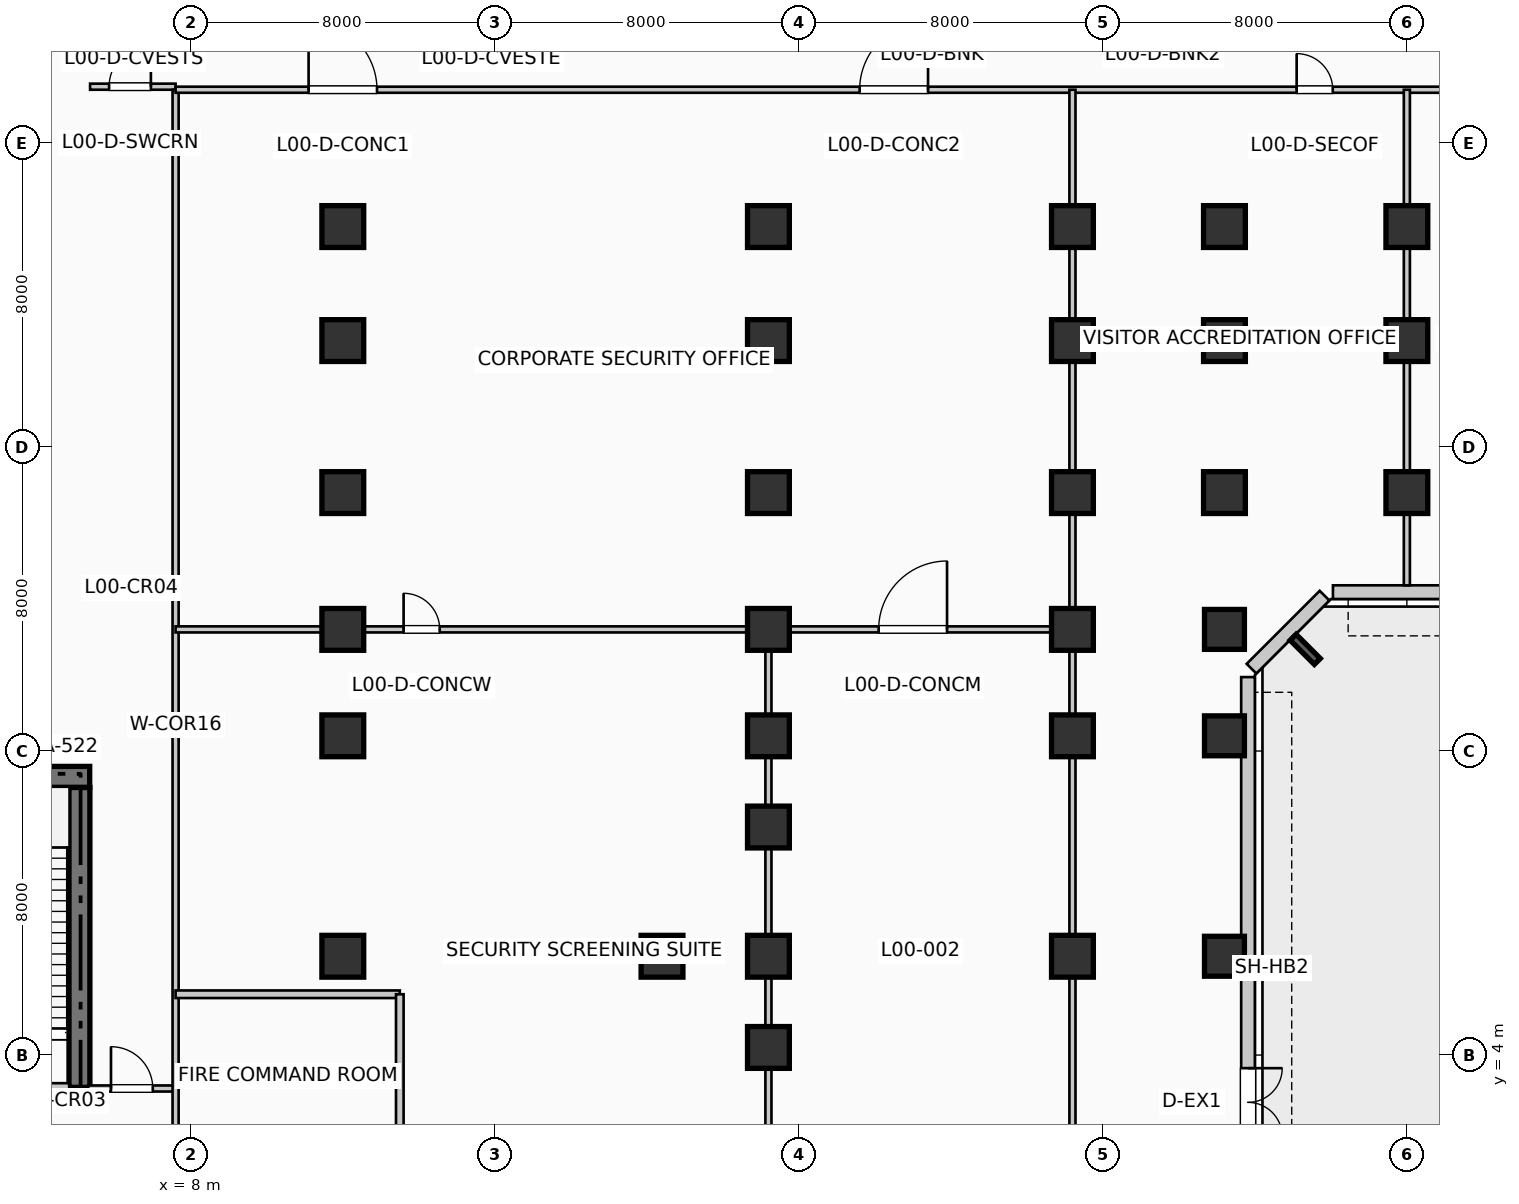
"""IFC4 building model, lengths in metres.
Left out: names, types, materials, properties, quantities, classifications, styles, units other than length and angle.
Written with IfcOpenShell. Run it as: python <this file> out.ifc"""

import sys

from ifc_helpers import new_model, si_unit, direction, frame, frame_2d, origin, origin_2d, place, context, subcontext, project, spatial, rectangle, extrude, element, fill, save


model = new_model("IFC4")
c1 = context("Model", 3, precision=1e-05, world=origin(), true_north=direction((0.0, 1.0)))
c2 = subcontext(c1, "Body", "Model", "MODEL_VIEW")
j1 = project(units=[si_unit("LENGTHUNIT", "METRE"), si_unit("PLANEANGLEUNIT", "RADIAN")], contexts=[c1])
p1 = place(None, origin())
s1 = spatial("IfcSite", under=j1, at=p1, CompositionType="ELEMENT")
p2 = place(p1, origin())
s2 = spatial("IfcBuilding", under=s1, at=p2, CompositionType="ELEMENT")
p3 = place(p2, origin())
s3 = spatial("IfcBuildingStorey", under=s2, at=p3, CompositionType="ELEMENT", Elevation=0.0)
p4 = place(p3, frame((5.07, 3.15, 0.0), z_axis=(0.0, 0.0, 1.0), x_axis=(0.0, 1.0, 0.0)))
e1 = element("IfcWall", 1, at=p4, inside=s3, PredefinedType="SHEAR", context=c2, shape_type="SweptSolid", body=[
    extrude(rectangle(XDim=7.89, YDim=0.55, at=frame_2d((3.945, 0.0))), origin(), (0.0, 0.0, 1.0), 5.94),
])
p5 = place(p3, frame((1.1, 11.32, 0.0), z_axis=(0.0, 0.0, 1.0), x_axis=(1.0, 0.0, 0.0)))
e2 = element("IfcWall", 2, at=p5, inside=s3, PredefinedType="SHEAR", context=c2, shape_type="SweptSolid", body=[
    extrude(rectangle(XDim=4.24, YDim=0.55, at=frame_2d((2.12, 0.0))), origin(), (0.0, 0.0, 1.0), 5.94),
])
for number, where, z_axis, x_axis in (
    (3, (12.0, 6.6, 0.0), (0.0, 0.0, 1.0), (1.0, 0.0, 0.0)),
    (4, (12.0, 12.4, 0.0), (0.0, 0.0, 1.0), (1.0, 0.0, 0.0)),
    (5, (12.0, 15.2, 0.0), (0.0, 0.0, 1.0), (1.0, 0.0, 0.0)),
    (6, (12.0, 18.8, 0.0), (0.0, 0.0, 1.0), (1.0, 0.0, 0.0)),
    (7, (12.0, 22.8, 0.0), (0.0, 0.0, 1.0), (1.0, 0.0, 0.0)),
    (8, (12.0, 25.8, 0.0), (0.0, 0.0, 1.0), (1.0, 0.0, 0.0)),
    (9, (20.4, 6.6, 0.0), (0.0, 0.0, 1.0), (1.0, 0.0, 0.0)),
    (10, (23.2, 4.2, 0.0), (0.0, 0.0, 1.0), (1.0, 0.0, 0.0)),
    (11, (23.2, 6.6, 0.0), (0.0, 0.0, 1.0), (1.0, 0.0, 0.0)),
    (12, (23.2, 10.0, 0.0), (0.0, 0.0, 1.0), (1.0, 0.0, 0.0)),
    (13, (23.2, 12.4, 0.0), (0.0, 0.0, 1.0), (1.0, 0.0, 0.0)),
    (14, (23.2, 15.2, 0.0), (0.0, 0.0, 1.0), (1.0, 0.0, 0.0)),
    (15, (23.2, 18.8, 0.0), (0.0, 0.0, 1.0), (1.0, 0.0, 0.0)),
    (16, (23.2, 22.8, 0.0), (0.0, 0.0, 1.0), (1.0, 0.0, 0.0)),
    (17, (23.2, 25.8, 0.0), (0.0, 0.0, 1.0), (1.0, 0.0, 0.0)),
    (18, (31.2, 6.6, 0.0), (0.0, 0.0, 1.0), (1.0, 0.0, 0.0)),
    (19, (31.2, 12.4, 0.0), (0.0, 0.0, 1.0), (1.0, 0.0, 0.0)),
    (20, (31.2, 15.2, 0.0), (0.0, 0.0, 1.0), (1.0, 0.0, 0.0)),
    (21, (31.2, 18.8, 0.0), (0.0, 0.0, 1.0), (1.0, 0.0, 0.0)),
    (22, (31.2, 22.8, 0.0), (0.0, 0.0, 1.0), (1.0, 0.0, 0.0)),
    (23, (31.2, 25.8, 0.0), (0.0, 0.0, 1.0), (1.0, 0.0, 0.0)),
):
    element("IfcColumn", number, at=place(p3, frame(where, z_axis=z_axis, x_axis=x_axis)), inside=s3, PredefinedType="COLUMN", context=c2, shape_type="SweptSolid", body=[
        extrude(rectangle(XDim=1.1, YDim=1.1, at=origin_2d()), origin(), (0.0, 0.0, 1.0), 5.94),
    ])
for number, where, z_axis, x_axis in (
    (24, (35.2, 6.6, 0.0), (0.0, 0.0, 1.0), (1.0, 0.0, 0.0)),
    (25, (35.2, 12.4, 0.0), (0.0, 0.0, 1.0), (1.0, 0.0, 0.0)),
    (26, (35.2, 15.2, 0.0), (0.0, 0.0, 1.0), (1.0, 0.0, 0.0)),
):
    element("IfcColumn", number, at=place(p3, frame(where, z_axis=z_axis, x_axis=x_axis)), inside=s3, PredefinedType="COLUMN", context=c2, shape_type="SweptSolid", body=[
        extrude(rectangle(XDim=1.05, YDim=1.05, at=origin_2d()), origin(), (0.0, 0.0, 1.0), 5.94),
    ])
for number, where, z_axis, x_axis in (
    (27, (35.2, 18.8, 0.0), (0.0, 0.0, 1.0), (1.0, 0.0, 0.0)),
    (28, (35.2, 22.8, 0.0), (0.0, 0.0, 1.0), (1.0, 0.0, 0.0)),
    (29, (35.2, 25.8, 0.0), (0.0, 0.0, 1.0), (1.0, 0.0, 0.0)),
    (30, (40.0, 18.8, 0.0), (0.0, 0.0, 1.0), (1.0, 0.0, 0.0)),
    (31, (40.0, 22.8, 0.0), (0.0, 0.0, 1.0), (1.0, 0.0, 0.0)),
    (32, (40.0, 25.8, 0.0), (0.0, 0.0, 1.0), (1.0, 0.0, 0.0)),
):
    element("IfcColumn", number, at=place(p3, frame(where, z_axis=z_axis, x_axis=x_axis)), inside=s3, PredefinedType="COLUMN", context=c2, shape_type="SweptSolid", body=[
        extrude(rectangle(XDim=1.1, YDim=1.1, at=origin_2d()), origin(), (0.0, 0.0, 1.0), 5.94),
    ])
p6 = place(p3, frame((35.82, 1.055, 0.0), z_axis=(0.0, 0.0, 1.0), x_axis=(0.0, 1.0, 0.0)))
e33 = element("IfcWall", 33, at=p6, inside=s3, PredefinedType="SOLIDWALL", context=c2, shape_type="SweptSolid", body=[
    extrude(rectangle(XDim=12.89, YDim=0.36, at=frame_2d((6.445, 0.0))), origin(), (0.0, 0.0, 1.0), 5.62),
])
p7 = place(p6, frame((2.6, 0.0, 0.0), z_axis=(0.0, 0.0, 1.0), x_axis=(-1.0, 0.0, 0.0)))
e34 = element("IfcOpeningElement", 34, at=p7, cuts=e33, PredefinedType="OPENING", context=c2, shape_type="SweptSolid", body=[
    extrude(rectangle(XDim=1.8, YDim=2.4, at=frame_2d((0.9, 1.2))), frame((0.0, 0.19, 0.0), z_axis=(0.0, -1.0, 0.0), x_axis=(1.0, 0.0, 0.0)), (0.0, 0.0, 1.0), 0.38),
])
p8 = place(p3, frame((35.912, 14.166, 0.0), z_axis=(0.0, 0.0, 1.0), x_axis=(0.707106781187, 0.707106781187, 0.0)))
e35 = element("IfcWall", 35, at=p8, inside=s3, PredefinedType="SOLIDWALL", context=c2, shape_type="SweptSolid", body=[
    extrude(rectangle(XDim=2.718, YDim=0.36, at=frame_2d((1.359, 0.0))), origin(), (0.0, 0.0, 1.0), 5.62),
])
p9 = place(p3, frame((38.055, 16.18, 0.0), z_axis=(0.0, 0.0, 1.0), x_axis=(1.0, 0.0, 0.0)))
e36 = element("IfcWall", 36, at=p9, inside=s3, PredefinedType="SOLIDWALL", context=c2, shape_type="SweptSolid", body=[
    extrude(rectangle(XDim=40.89, YDim=0.36, at=frame_2d((20.445, 0.0))), origin(), (0.0, 0.0, 1.0), 5.62),
])
p10 = place(p9, frame((4.745, 0.0, 0.0), z_axis=(0.0, 0.0, 1.0), x_axis=(-1.0, 0.0, 0.0)))
e37 = element("IfcOpeningElement", 37, at=p10, cuts=e36, PredefinedType="OPENING", context=c2, shape_type="SweptSolid", body=[
    extrude(rectangle(XDim=1.8, YDim=2.2, at=frame_2d((0.9, 1.1))), frame((0.0, 0.19, 0.0), z_axis=(0.0, -1.0, 0.0), x_axis=(1.0, 0.0, 0.0)), (0.0, 0.0, 1.0), 0.38),
])
p11 = place(p9, frame((9.345, 0.0, 0.0), z_axis=(0.0, 0.0, 1.0), x_axis=(-1.0, 0.0, 0.0)))
e38 = element("IfcOpeningElement", 38, at=p11, cuts=e36, PredefinedType="OPENING", context=c2, shape_type="SweptSolid", body=[
    extrude(rectangle(XDim=1.8, YDim=2.2, at=frame_2d((0.9, 1.1))), frame((0.0, 0.19, 0.0), z_axis=(0.0, -1.0, 0.0), x_axis=(1.0, 0.0, 0.0)), (0.0, 0.0, 1.0), 0.38),
])
p12 = place(p9, frame((16.145, 0.0, 0.0), z_axis=(0.0, 0.0, 1.0), x_axis=(-1.0, 0.0, 0.0)))
e39 = element("IfcOpeningElement", 39, at=p12, cuts=e36, PredefinedType="OPENING", context=c2, shape_type="SweptSolid", body=[
    extrude(rectangle(XDim=1.8, YDim=2.2, at=frame_2d((0.9, 1.1))), frame((0.0, 0.19, 0.0), z_axis=(0.0, -1.0, 0.0), x_axis=(1.0, 0.0, 0.0)), (0.0, 0.0, 1.0), 0.38),
])
p13 = place(p9, frame((32.0, 0.0, 0.0), z_axis=(0.0, 0.0, 1.0), x_axis=(-1.0, 0.0, 0.0)))
e40 = element("IfcOpeningElement", 40, at=p13, cuts=e36, PredefinedType="OPENING", context=c2, shape_type="SweptSolid", body=[
    extrude(rectangle(XDim=1.8, YDim=2.4, at=frame_2d((0.9, 1.2))), frame((0.0, 0.19, 0.0), z_axis=(0.0, -1.0, 0.0), x_axis=(1.0, 0.0, 0.0)), (0.0, 0.0, 1.0), 0.38),
])
p14 = place(p3, frame((1.65, 3.15, 0.0), z_axis=(0.0, 0.0, 1.0), x_axis=(1.0, 0.0, 0.0)))
e41 = element("IfcWall", 41, at=p14, inside=s3, PredefinedType="PARTITIONING", context=c2, shape_type="SweptSolid", body=[
    extrude(rectangle(XDim=3.15, YDim=0.22, at=frame_2d((1.575, 0.0))), origin(), (0.0, 0.0, 1.0), 5.62),
])
p15 = place(p14, frame((2.1, 0.0, 0.0), z_axis=(0.0, 0.0, 1.0), x_axis=(-1.0, 0.0, 0.0)))
e42 = element("IfcOpeningElement", 42, at=p15, cuts=e41, PredefinedType="OPENING", context=c2, shape_type="SweptSolid", body=[
    extrude(rectangle(XDim=1.05, YDim=2.15, at=frame_2d((0.525, 1.075))), frame((0.0, 0.12, 0.0), z_axis=(0.0, -1.0, 0.0), x_axis=(1.0, 0.0, 0.0)), (0.0, 0.0, 1.0), 0.24),
])
p16 = place(p3, frame((5.3, 3.12, 0.0), z_axis=(0.0, 0.0, 1.0), x_axis=(1.0, 0.0, 0.0)))
e43 = element("IfcWall", 43, at=p16, inside=s3, PredefinedType="PARTITIONING", context=c2, shape_type="SweptSolid", body=[
    extrude(rectangle(XDim=2.3, YDim=0.16, at=frame_2d((1.15, 0.0))), origin(), (0.0, 0.0, 1.0), 5.62),
])
p17 = place(p16, frame((0.6, 0.0, 0.0)))
e44 = element("IfcOpeningElement", 44, at=p17, cuts=e43, PredefinedType="OPENING", context=c2, shape_type="SweptSolid", body=[
    extrude(rectangle(XDim=1.1, YDim=2.15, at=frame_2d((0.55, 1.075))), frame((0.0, 0.09, 0.0), z_axis=(0.0, -1.0, 0.0), x_axis=(1.0, 0.0, 0.0)), (0.0, 0.0, 1.0), 0.18),
])
p18 = place(p3, frame((5.35, 29.48, 0.0), z_axis=(0.0, 0.0, 1.0), x_axis=(1.0, 0.0, 0.0)))
e45 = element("IfcWall", 45, at=p18, inside=s3, PredefinedType="PARTITIONING", context=c2, shape_type="SweptSolid", body=[
    extrude(rectangle(XDim=2.25, YDim=0.16, at=frame_2d((1.125, 0.0))), origin(), (0.0, 0.0, 1.0), 5.275),
])
p19 = place(p18, frame((0.5, 0.0, 0.0)))
e46 = element("IfcOpeningElement", 46, at=p19, cuts=e45, PredefinedType="OPENING", context=c2, shape_type="SweptSolid", body=[
    extrude(rectangle(XDim=1.1, YDim=2.15, at=frame_2d((0.55, 1.075))), frame((0.0, 0.09, 0.0), z_axis=(0.0, -1.0, 0.0), x_axis=(1.0, 0.0, 0.0)), (0.0, 0.0, 1.0), 0.18),
])
p20 = place(p3, frame((7.6, -1.64, 0.0), z_axis=(0.0, 0.0, 1.0), x_axis=(0.0, 1.0, 0.0)))
e47 = element("IfcWall", 47, at=p20, inside=s3, PredefinedType="PARTITIONING", context=c2, shape_type="SweptSolid", body=[
    extrude(rectangle(XDim=31.04, YDim=0.16, at=frame_2d((15.52, 0.0))), origin(), (0.0, 0.0, 1.0), 5.62),
])
p21 = place(p20, frame((1.8, 0.0, 0.0)))
e48 = element("IfcOpeningElement", 48, at=p21, cuts=e47, PredefinedType="OPENING", context=c2, shape_type="SweptSolid", body=[
    extrude(rectangle(XDim=1.1, YDim=2.15, at=frame_2d((0.55, 1.075))), frame((0.0, 0.09, 0.0), z_axis=(0.0, -1.0, 0.0), x_axis=(1.0, 0.0, 0.0)), (0.0, 0.0, 1.0), 0.18),
])
p22 = place(p3, frame((7.6, 5.6, 0.0), z_axis=(0.0, 0.0, 1.0), x_axis=(1.0, 0.0, 0.0)))
e49 = element("IfcWall", 49, at=p22, inside=s3, PredefinedType="PARTITIONING", context=c2, shape_type="SweptSolid", body=[
    extrude(rectangle(XDim=5.9, YDim=0.2, at=frame_2d((2.95, 0.0))), origin(), (0.0, 0.0, 1.0), 5.62),
])
p23 = place(p3, frame((13.5, -1.64, 0.0), z_axis=(0.0, 0.0, 1.0), x_axis=(0.0, 1.0, 0.0)))
e50 = element("IfcWall", 50, at=p23, inside=s3, PredefinedType="PARTITIONING", context=c2, shape_type="SweptSolid", body=[
    extrude(rectangle(XDim=7.24, YDim=0.2, at=frame_2d((3.62, 0.0))), origin(), (0.0, 0.0, 1.0), 5.62),
])
p24 = place(p3, frame((7.6, 29.4, 0.0), z_axis=(0.0, 0.0, 1.0), x_axis=(1.0, 0.0, 0.0)))
e51 = element("IfcWall", 51, at=p24, inside=s3, PredefinedType="PARTITIONING", context=c2, shape_type="SweptSolid", body=[
    extrude(rectangle(XDim=43.75, YDim=0.16, at=frame_2d((21.875, 0.0))), origin(), (0.0, 0.0, 1.0), 5.275),
])
p25 = place(p24, frame((3.5, 0.0, 0.0)))
e52 = element("IfcOpeningElement", 52, at=p25, cuts=e51, PredefinedType="OPENING", context=c2, shape_type="SweptSolid", body=[
    extrude(rectangle(XDim=1.8, YDim=2.3, at=frame_2d((0.9, 1.15))), frame((0.0, 0.09, 0.0), z_axis=(0.0, -1.0, 0.0), x_axis=(1.0, 0.0, 0.0)), (0.0, 0.0, 1.0), 0.18),
])
p26 = place(p24, frame((18.0, 0.0, 0.0)))
e53 = element("IfcOpeningElement", 53, at=p26, cuts=e51, PredefinedType="OPENING", context=c2, shape_type="SweptSolid", body=[
    extrude(rectangle(XDim=1.8, YDim=2.3, at=frame_2d((0.9, 1.15))), frame((0.0, 0.09, 0.0), z_axis=(0.0, -1.0, 0.0), x_axis=(1.0, 0.0, 0.0)), (0.0, 0.0, 1.0), 0.18),
])
p27 = place(p24, frame((29.5, 0.0, 0.0)))
e54 = element("IfcOpeningElement", 54, at=p27, cuts=e51, PredefinedType="OPENING", context=c2, shape_type="SweptSolid", body=[
    extrude(rectangle(XDim=0.95, YDim=2.15, at=frame_2d((0.475, 1.075))), frame((0.0, 0.09, 0.0), z_axis=(0.0, -1.0, 0.0), x_axis=(1.0, 0.0, 0.0)), (0.0, 0.0, 1.0), 0.18),
])
p28 = place(p24, frame((35.5, 0.0, 0.0)))
e55 = element("IfcOpeningElement", 55, at=p28, cuts=e51, PredefinedType="OPENING", context=c2, shape_type="SweptSolid", body=[
    extrude(rectangle(XDim=1.8, YDim=2.3, at=frame_2d((0.9, 1.15))), frame((0.0, 0.09, 0.0), z_axis=(0.0, -1.0, 0.0), x_axis=(1.0, 0.0, 0.0)), (0.0, 0.0, 1.0), 0.18),
])
p29 = place(p3, frame((7.6, 15.2, 0.0), z_axis=(0.0, 0.0, 1.0), x_axis=(1.0, 0.0, 0.0)))
e56 = element("IfcWall", 56, at=p29, inside=s3, PredefinedType="PARTITIONING", context=c2, shape_type="SweptSolid", body=[
    extrude(rectangle(XDim=23.6, YDim=0.16, at=frame_2d((11.8, 0.0))), origin(), (0.0, 0.0, 1.0), 4.805),
])
p30 = place(p29, frame((6.0, 0.0, 0.0)))
e57 = element("IfcOpeningElement", 57, at=p30, cuts=e56, PredefinedType="OPENING", context=c2, shape_type="SweptSolid", body=[
    extrude(rectangle(XDim=0.95, YDim=2.15, at=frame_2d((0.475, 1.075))), frame((0.0, 0.09, 0.0), z_axis=(0.0, -1.0, 0.0), x_axis=(1.0, 0.0, 0.0)), (0.0, 0.0, 1.0), 0.18),
])
p31 = place(p29, frame((18.5, 0.0, 0.0)))
e58 = element("IfcOpeningElement", 58, at=p31, cuts=e56, PredefinedType="OPENING", context=c2, shape_type="SweptSolid", body=[
    extrude(rectangle(XDim=1.8, YDim=2.3, at=frame_2d((0.9, 1.15))), frame((0.0, 0.09, 0.0), z_axis=(0.0, -1.0, 0.0), x_axis=(1.0, 0.0, 0.0)), (0.0, 0.0, 1.0), 0.18),
])
p32 = place(p3, frame((23.2, -1.64, 0.0), z_axis=(0.0, 0.0, 1.0), x_axis=(0.0, 1.0, 0.0)))
e59 = element("IfcWall", 59, at=p32, inside=s3, PredefinedType="PARTITIONING", context=c2, shape_type="SweptSolid", body=[
    extrude(rectangle(XDim=16.84, YDim=0.16, at=frame_2d((8.42, 0.0))), origin(), (0.0, 0.0, 1.0), 4.955),
])
p33 = place(p3, frame((31.2, -1.64, 0.0), z_axis=(0.0, 0.0, 1.0), x_axis=(0.0, 1.0, 0.0)))
e60 = element("IfcWall", 60, at=p33, inside=s3, PredefinedType="PARTITIONING", context=c2, shape_type="SweptSolid", body=[
    extrude(rectangle(XDim=31.04, YDim=0.16, at=frame_2d((15.52, 0.0))), origin(), (0.0, 0.0, 1.0), 4.805),
])
p34 = place(p3, frame((40.0, 16.36, 0.0), z_axis=(0.0, 0.0, 1.0), x_axis=(0.0, 1.0, 0.0)))
e61 = element("IfcWall", 61, at=p34, inside=s3, PredefinedType="PARTITIONING", context=c2, shape_type="SweptSolid", body=[
    extrude(rectangle(XDim=13.04, YDim=0.16, at=frame_2d((6.52, 0.0))), origin(), (0.0, 0.0, 1.0), 4.805),
])
p35 = place(p7, origin())
e62 = element("IfcDoor", 62, at=p35, inside=s3, OperationType="DOUBLE_DOOR_SINGLE_SWING", PredefinedType="DOOR", context=c2, shape_type="SweptSolid", body=[
    extrude(rectangle(XDim=1.8, YDim=2.4, at=frame_2d((0.9, 1.2))), frame((0.0, 0.025, 0.0), z_axis=(0.0, -1.0, 0.0), x_axis=(1.0, 0.0, 0.0)), (0.0, 0.0, 1.0), 0.05),
])
fill(e34, e62)
p36 = place(p17, origin())
e63 = element("IfcDoor", 63, at=p36, inside=s3, OperationType="SINGLE_SWING_LEFT", PredefinedType="DOOR", context=c2, shape_type="SweptSolid", body=[
    extrude(rectangle(XDim=1.1, YDim=2.15, at=frame_2d((0.55, 1.075))), frame((0.0, 0.025, 0.0), z_axis=(0.0, -1.0, 0.0), x_axis=(1.0, 0.0, 0.0)), (0.0, 0.0, 1.0), 0.05),
])
fill(e44, e63)
p37 = place(p19, origin())
e64 = element("IfcDoor", 64, at=p37, inside=s3, OperationType="SINGLE_SWING_RIGHT", PredefinedType="DOOR", context=c2, shape_type="SweptSolid", body=[
    extrude(rectangle(XDim=1.1, YDim=2.15, at=frame_2d((0.55, 1.075))), frame((0.0, 0.025, 0.0), z_axis=(0.0, -1.0, 0.0), x_axis=(1.0, 0.0, 0.0)), (0.0, 0.0, 1.0), 0.05),
])
fill(e46, e64)
p38 = place(p25, origin())
e65 = element("IfcDoor", 65, at=p38, inside=s3, OperationType="SINGLE_SWING_LEFT", PredefinedType="DOOR", context=c2, shape_type="SweptSolid", body=[
    extrude(rectangle(XDim=1.8, YDim=2.3, at=frame_2d((0.9, 1.15))), frame((0.0, 0.025, 0.0), z_axis=(0.0, -1.0, 0.0), x_axis=(1.0, 0.0, 0.0)), (0.0, 0.0, 1.0), 0.05),
])
fill(e52, e65)
p39 = place(p26, origin())
e66 = element("IfcDoor", 66, at=p39, inside=s3, OperationType="SINGLE_SWING_RIGHT", PredefinedType="DOOR", context=c2, shape_type="SweptSolid", body=[
    extrude(rectangle(XDim=1.8, YDim=2.3, at=frame_2d((0.9, 1.15))), frame((0.0, 0.025, 0.0), z_axis=(0.0, -1.0, 0.0), x_axis=(1.0, 0.0, 0.0)), (0.0, 0.0, 1.0), 0.05),
])
fill(e53, e66)
p40 = place(p27, origin())
e67 = element("IfcDoor", 67, at=p40, inside=s3, OperationType="SINGLE_SWING_LEFT", PredefinedType="DOOR", context=c2, shape_type="SweptSolid", body=[
    extrude(rectangle(XDim=0.95, YDim=2.15, at=frame_2d((0.475, 1.075))), frame((0.0, 0.025, 0.0), z_axis=(0.0, -1.0, 0.0), x_axis=(1.0, 0.0, 0.0)), (0.0, 0.0, 1.0), 0.05),
])
fill(e54, e67)
p41 = place(p30, origin())
e68 = element("IfcDoor", 68, at=p41, inside=s3, OperationType="SINGLE_SWING_LEFT", PredefinedType="DOOR", context=c2, shape_type="SweptSolid", body=[
    extrude(rectangle(XDim=0.95, YDim=2.15, at=frame_2d((0.475, 1.075))), frame((0.0, 0.025, 0.0), z_axis=(0.0, -1.0, 0.0), x_axis=(1.0, 0.0, 0.0)), (0.0, 0.0, 1.0), 0.05),
])
fill(e57, e68)
p42 = place(p31, origin())
e69 = element("IfcDoor", 69, at=p42, inside=s3, OperationType="SINGLE_SWING_RIGHT", PredefinedType="DOOR", context=c2, shape_type="SweptSolid", body=[
    extrude(rectangle(XDim=1.8, YDim=2.3, at=frame_2d((0.9, 1.15))), frame((0.0, 0.025, 0.0), z_axis=(0.0, -1.0, 0.0), x_axis=(1.0, 0.0, 0.0)), (0.0, 0.0, 1.0), 0.05),
])
fill(e58, e69)
save(model, sys.argv[1])
